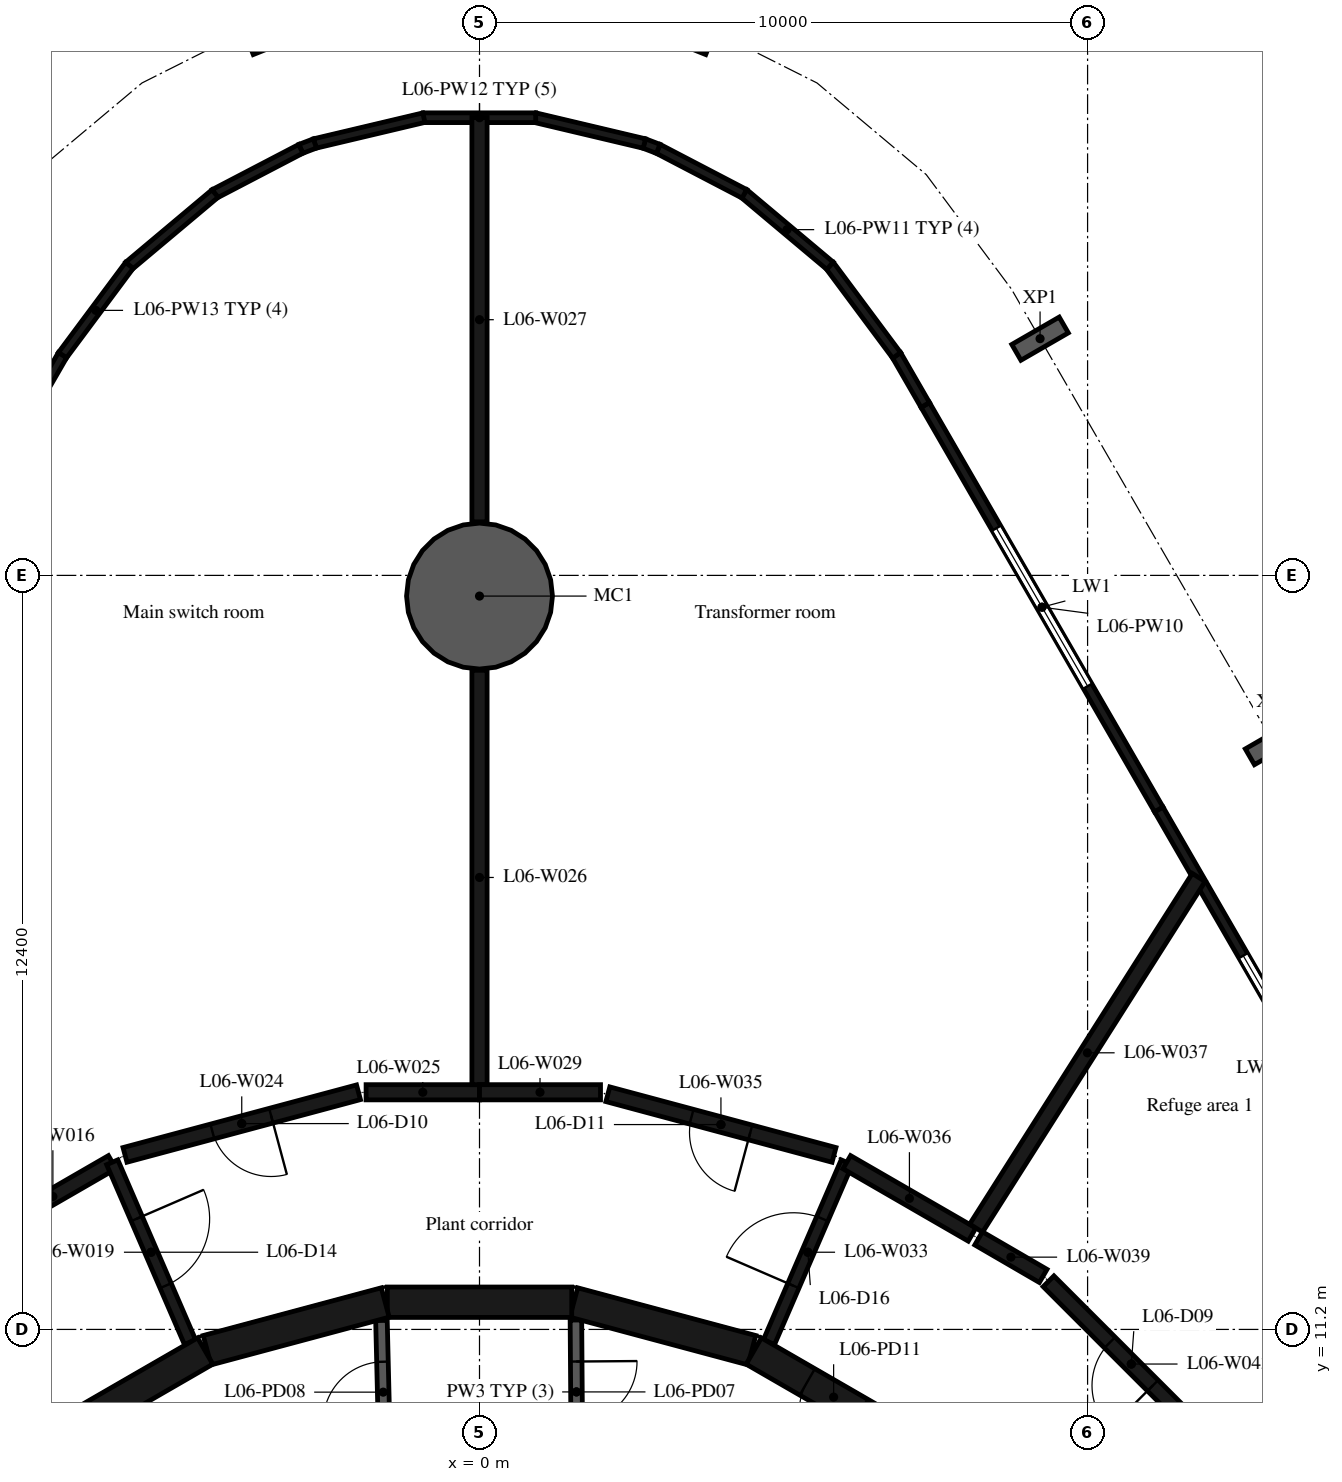
"""IFC4 building model, lengths in metres.
Left out: names, types, materials, properties, quantities, classifications, styles, units other than length and angle.
Written with IfcOpenShell. Run it as: python <this file> out.ifc"""

import sys

from ifc_helpers import new_model, si_unit, direction, frame, frame_2d, origin, origin_2d, place, context, subcontext, project, spatial, rectangle, hollow_circle, i_section, extrude, element, fill, save


model = new_model("IFC4")
c1 = context("Model", 3, precision=1e-05, world=origin(), true_north=direction((0.0, 1.0)))
c2 = subcontext(c1, "Body", "Model", "MODEL_VIEW")
j1 = project(units=[si_unit("LENGTHUNIT", "METRE"), si_unit("PLANEANGLEUNIT", "RADIAN")], contexts=[c1])
p1 = place(None, origin())
s1 = spatial("IfcSite", under=j1, at=p1, CompositionType="ELEMENT")
p2 = place(p1, origin())
s2 = spatial("IfcBuilding", under=s1, at=p2, CompositionType="ELEMENT")
p3 = place(p2, frame((0.0, 0.0, 33.0)))
s3 = spatial("IfcBuildingStorey", under=s2, at=p3, CompositionType="ELEMENT", Elevation=33.0)
p4 = place(p3, frame((0.0, 23.26, -0.45), z_axis=(0.0, 0.0, 1.0), x_axis=(1.0, 0.0, 0.0)))
e1 = element("IfcColumn", 1, at=p4, inside=s3, PredefinedType="COLUMN", context=c2, shape_type="SweptSolid", body=[
    extrude(hollow_circle(Radius=1.2, WallThickness=0.06, at=origin_2d()), origin(), (0.0, 0.0, 1.0), 5.4),
])
for number, where, z_axis, x_axis in (
    (2, (13.059, 20.842, -0.45), (0.0, 0.0, 1.0), (0.5, -0.866, 0.0)),
    (3, (9.219, 27.493, -0.45), (0.0, 0.0, 1.0), (0.5, -0.866, 0.0)),
    (4, (3.748, 32.639, -0.45), (0.0, 0.0, 1.0), (0.929, -0.371, 0.0)),
    (5, (-3.748, 32.639, -0.45), (0.0, 0.0, 1.0), (0.929, 0.371, 0.0)),
):
    element("IfcColumn", number, at=place(p3, frame(where, z_axis=z_axis, x_axis=x_axis)), inside=s3, PredefinedType="COLUMN", context=c2, shape_type="SweptSolid", body=[
        extrude(i_section(OverallWidth=0.3, OverallDepth=0.9, WebThickness=0.019, FlangeThickness=0.035, FilletRadius=0.03, at=origin_2d()), origin(), (0.0, 0.0, 1.0), 5.4),
    ])
p5 = place(p3, frame((15.011, 13.101, 0.0), z_axis=(0.0, 0.0, 1.0), x_axis=(-0.500005879718, 0.866022009101, 0.0)))
e6 = element("IfcWall", 6, at=p5, inside=s3, PredefinedType="STANDARD", context=c2, shape_type="SweptSolid", body=[
    extrude(rectangle(XDim=7.68, YDim=0.16, at=frame_2d((3.84, 0.0))), origin(), (0.0, 0.0, 1.0), 4.95),
])
p6 = place(p5, frame((1.902, 0.0, 1.0)))
e7 = element("IfcOpeningElement", 7, at=p6, cuts=e6, PredefinedType="OPENING", context=c2, shape_type="SweptSolid", body=[
    extrude(rectangle(XDim=3.0, YDim=2.2, at=frame_2d((1.5, 1.1))), frame((0.0, 0.09, 0.0), z_axis=(0.0, -1.0, 0.0), x_axis=(1.0, 0.0, 0.0)), (0.0, 0.0, 1.0), 0.18),
])
p7 = place(p3, frame((11.171, 19.752, 0.0), z_axis=(0.0, 0.0, 1.0), x_axis=(-0.500005879718, 0.866022009101, 0.0)))
e8 = element("IfcWall", 8, at=p7, inside=s3, PredefinedType="STANDARD", context=c2, shape_type="SweptSolid", body=[
    extrude(rectangle(XDim=7.68, YDim=0.16, at=frame_2d((3.84, 0.0))), origin(), (0.0, 0.0, 1.0), 4.95),
])
p8 = place(p7, frame((2.34, 0.0, 1.0)))
e9 = element("IfcOpeningElement", 9, at=p8, cuts=e8, PredefinedType="OPENING", context=c2, shape_type="SweptSolid", body=[
    extrude(rectangle(XDim=3.0, YDim=2.2, at=frame_2d((1.5, 1.1))), frame((0.0, 0.09, 0.0), z_axis=(0.0, -1.0, 0.0), x_axis=(1.0, 0.0, 0.0)), (0.0, 0.0, 1.0), 0.18),
])
p9 = place(p3, frame((7.331, 26.403, 0.0), z_axis=(0.0, 0.0, 1.0), x_axis=(-0.499916178513, 0.866073792734, 0.0)))
e10 = element("IfcWall", 10, at=p9, inside=s3, PredefinedType="STANDARD", context=c2, shape_type="SweptSolid", body=[
    extrude(rectangle(XDim=0.946, YDim=0.16, at=frame_2d((0.473, 0.0))), origin(), (0.0, 0.0, 1.0), 4.95),
])
p10 = place(p3, frame((6.86, 27.218, 0.0), z_axis=(0.0, 0.0, 1.0), x_axis=(-0.597202782017, 0.802090292393, 0.0)))
e11 = element("IfcWall", 11, at=p10, inside=s3, PredefinedType="STANDARD", context=c2, shape_type="SweptSolid", body=[
    extrude(rectangle(XDim=1.846, YDim=0.16, at=frame_2d((0.923, 0.0))), origin(), (0.0, 0.0, 1.0), 4.95),
])
p11 = place(p3, frame((5.764, 28.692, 0.0), z_axis=(0.0, 0.0, 1.0), x_axis=(-0.766050926865, 0.64277988258, 0.0)))
e12 = element("IfcWall", 12, at=p11, inside=s3, PredefinedType="STANDARD", context=c2, shape_type="SweptSolid", body=[
    extrude(rectangle(XDim=1.848, YDim=0.16, at=frame_2d((0.924, 0.0))), origin(), (0.0, 0.0, 1.0), 4.95),
])
p12 = place(p3, frame((4.356, 29.875, 0.0), z_axis=(0.0, 0.0, 1.0), x_axis=(-0.886563052372, 0.462607775734, 0.0)))
e13 = element("IfcWall", 13, at=p12, inside=s3, PredefinedType="STANDARD", context=c2, shape_type="SweptSolid", body=[
    extrude(rectangle(XDim=1.598, YDim=0.16, at=frame_2d((0.799, 0.0))), origin(), (0.0, 0.0, 1.0), 4.95),
])
p13 = place(p3, frame((2.939, 30.614, 0.0), z_axis=(0.0, 0.0, 1.0), x_axis=(-0.934301433369, 0.356483985059, 0.0)))
e14 = element("IfcWall", 14, at=p13, inside=s3, PredefinedType="STANDARD", context=c2, shape_type="SweptSolid", body=[
    extrude(rectangle(XDim=0.249, YDim=0.16, at=frame_2d((0.125, 0.0))), origin(), (0.0, 0.0, 1.0), 4.95),
])
p14 = place(p3, frame((2.711, 30.702, 0.0), z_axis=(0.0, 0.0, 1.0), x_axis=(-0.973077946325, 0.230476268575, 0.0)))
e15 = element("IfcWall", 15, at=p14, inside=s3, PredefinedType="STANDARD", context=c2, shape_type="SweptSolid", body=[
    extrude(rectangle(XDim=1.846, YDim=0.16, at=frame_2d((0.923, 0.0))), origin(), (0.0, 0.0, 1.0), 4.95),
])
p15 = place(p3, frame((0.924, 31.126, 0.0), z_axis=(0.0, 0.0, 1.0), x_axis=(-1.0, 0.0, 0.0)))
e16 = element("IfcWall", 16, at=p15, inside=s3, PredefinedType="STANDARD", context=c2, shape_type="SweptSolid", body=[
    extrude(rectangle(XDim=1.848, YDim=0.16, at=frame_2d((0.924, 0.0))), origin(), (0.0, 0.0, 1.0), 4.95),
])
p16 = place(p3, frame((-0.915, 31.127, 0.0), z_axis=(0.0, 0.0, 1.0), x_axis=(-0.973077946325, -0.230476268575, 0.0)))
e17 = element("IfcWall", 17, at=p16, inside=s3, PredefinedType="STANDARD", context=c2, shape_type="SweptSolid", body=[
    extrude(rectangle(XDim=1.846, YDim=0.16, at=frame_2d((0.923, 0.0))), origin(), (0.0, 0.0, 1.0), 4.95),
])
p17 = place(p3, frame((-2.706, 30.703, 0.0), z_axis=(0.0, 0.0, 1.0), x_axis=(-0.934301433369, -0.356483985059, 0.0)))
e18 = element("IfcWall", 18, at=p17, inside=s3, PredefinedType="STANDARD", context=c2, shape_type="SweptSolid", body=[
    extrude(rectangle(XDim=0.249, YDim=0.16, at=frame_2d((0.125, 0.0))), origin(), (0.0, 0.0, 1.0), 4.95),
])
p18 = place(p3, frame((-2.939, 30.614, 0.0), z_axis=(0.0, 0.0, 1.0), x_axis=(-0.886563052372, -0.462607775734, 0.0)))
e19 = element("IfcWall", 19, at=p18, inside=s3, PredefinedType="STANDARD", context=c2, shape_type="SweptSolid", body=[
    extrude(rectangle(XDim=1.598, YDim=0.16, at=frame_2d((0.799, 0.0))), origin(), (0.0, 0.0, 1.0), 4.95),
])
p19 = place(p3, frame((-4.349, 29.88, 0.0), z_axis=(0.0, 0.0, 1.0), x_axis=(-0.766050926865, -0.64277988258, 0.0)))
e20 = element("IfcWall", 20, at=p19, inside=s3, PredefinedType="STANDARD", context=c2, shape_type="SweptSolid", body=[
    extrude(rectangle(XDim=1.848, YDim=0.16, at=frame_2d((0.924, 0.0))), origin(), (0.0, 0.0, 1.0), 4.95),
])
p20 = place(p3, frame((-5.758, 28.698, 0.0), z_axis=(0.0, 0.0, 1.0), x_axis=(-0.597202782017, -0.802090292393, 0.0)))
e21 = element("IfcWall", 21, at=p20, inside=s3, PredefinedType="STANDARD", context=c2, shape_type="SweptSolid", body=[
    extrude(rectangle(XDim=1.846, YDim=0.16, at=frame_2d((0.923, 0.0))), origin(), (0.0, 0.0, 1.0), 4.95),
])
p21 = place(p3, frame((-6.858, 27.222, 0.0), z_axis=(0.0, 0.0, 1.0), x_axis=(-0.499916178513, -0.866073792734, 0.0)))
e22 = element("IfcWall", 22, at=p21, inside=s3, PredefinedType="STANDARD", context=c2, shape_type="SweptSolid", body=[
    extrude(rectangle(XDim=0.946, YDim=0.16, at=frame_2d((0.473, 0.0))), origin(), (0.0, 0.0, 1.0), 4.95),
])
p22 = place(p3, frame((7.137, 9.329, 0.0), z_axis=(0.0, 0.0, 1.0), x_axis=(-0.865975092491, 0.500087131594, 0.0)))
e23 = element("IfcWall", 23, at=p22, inside=s3, PredefinedType="SHEAR", context=c2, shape_type="SweptSolid", body=[
    extrude(rectangle(XDim=3.033, YDim=0.5, at=frame_2d((1.516, 0.0))), origin(), (0.0, 0.0, 1.0), 4.95),
])
p23 = place(p22, frame((1.016, 0.0, 0.0)))
e24 = element("IfcOpeningElement", 24, at=p23, cuts=e23, PredefinedType="OPENING", context=c2, shape_type="SweptSolid", body=[
    extrude(rectangle(XDim=1.0, YDim=2.4, at=frame_2d((0.5, 1.2))), frame((0.0, 0.26, 0.0), z_axis=(0.0, -1.0, 0.0), x_axis=(1.0, 0.0, 0.0)), (0.0, 0.0, 1.0), 0.52),
])
for number, where, z_axis, x_axis in (
    (25, (4.479, 10.858, 0.0), (0.0, 0.0, 1.0), (-0.966, 0.259, 0.0)),
    (26, (1.516, 11.647, 0.0), (0.0, 0.0, 1.0), (-1.0, 0.0, 0.0)),
    (27, (-1.55, 11.643, 0.0), (0.0, 0.0, 1.0), (-0.966, -0.259, 0.0)),
    (28, (-4.51, 10.845, 0.0), (0.0, 0.0, 1.0), (-0.866, -0.5, 0.0)),
):
    element("IfcWall", number, at=place(p3, frame(where, z_axis=z_axis, x_axis=x_axis)), inside=s3, PredefinedType="SHEAR", context=c2, shape_type="SweptSolid", body=[
        extrude(rectangle(XDim=3.033, YDim=0.5, at=frame_2d((1.516, 0.0))), origin(), (0.0, 0.0, 1.0), 4.95),
    ])
p24 = place(p3, frame((1.586, 11.354, 0.0), z_axis=(0.0, 0.0, 1.0), x_axis=(0.007227482881, -0.999973881405, 0.0)))
e29 = element("IfcWall", 29, at=p24, inside=s3, PredefinedType="PARTITIONING", context=c2, shape_type="SweptSolid", body=[
    extrude(rectangle(XDim=2.365, YDim=0.19, at=frame_2d((1.182, 0.0))), origin(), (0.0, 0.0, 1.0), 4.95),
])
p25 = place(p24, frame((0.682, 0.0, 0.0)))
e30 = element("IfcOpeningElement", 30, at=p25, cuts=e29, PredefinedType="OPENING", context=c2, shape_type="SweptSolid", body=[
    extrude(rectangle(XDim=1.0, YDim=2.4, at=frame_2d((0.5, 1.2))), frame((0.0, 0.105, 0.0), z_axis=(0.0, -1.0, 0.0), x_axis=(1.0, 0.0, 0.0)), (0.0, 0.0, 1.0), 0.21),
])
p26 = place(p3, frame((-1.555, 8.99, 0.0), z_axis=(0.0, 0.0, 1.0), x_axis=(-0.024125549686, 0.999708936567, 0.0)))
e31 = element("IfcWall", 31, at=p26, inside=s3, PredefinedType="PARTITIONING", context=c2, shape_type="SweptSolid", body=[
    extrude(rectangle(XDim=2.358, YDim=0.19, at=frame_2d((1.179, 0.0))), origin(), (0.0, 0.0, 1.0), 4.95),
])
p27 = place(p26, frame((0.679, 0.0, 0.0)))
e32 = element("IfcOpeningElement", 32, at=p27, cuts=e31, PredefinedType="OPENING", context=c2, shape_type="SweptSolid", body=[
    extrude(rectangle(XDim=1.0, YDim=2.4, at=frame_2d((0.5, 1.2))), frame((0.0, 0.105, 0.0), z_axis=(0.0, -1.0, 0.0), x_axis=(1.0, 0.0, 0.0)), (0.0, 0.0, 1.0), 0.21),
])
p28 = place(p3, frame((-7.992, 12.823, 0.0), z_axis=(0.0, 0.0, 1.0), x_axis=(0.865900522319, 0.500216238688, 0.0)))
e33 = element("IfcWall", 33, at=p28, inside=s3, PredefinedType="PARTITIONING", context=c2, shape_type="SweptSolid", body=[
    extrude(rectangle(XDim=2.254, YDim=0.25, at=frame_2d((1.127, 0.0))), origin(), (0.0, 0.0, 1.0), 4.95),
])
p29 = place(p3, frame((-6.04, 13.949, 0.0), z_axis=(0.0, 0.0, 1.0), x_axis=(0.396905977672, -0.917859272922, 0.0)))
e34 = element("IfcWall", 34, at=p29, inside=s3, PredefinedType="PARTITIONING", context=c2, shape_type="SweptSolid", body=[
    extrude(rectangle(XDim=3.224, YDim=0.2, at=frame_2d((1.612, 0.0))), origin(), (0.0, 0.0, 1.0), 4.95),
])
p30 = place(p29, frame((1.012, 0.0, 0.0)))
e35 = element("IfcOpeningElement", 35, at=p30, cuts=e34, PredefinedType="OPENING", context=c2, shape_type="SweptSolid", body=[
    extrude(rectangle(XDim=1.2, YDim=2.1, at=frame_2d((0.6, 1.05))), frame((0.0, 0.11, 0.0), z_axis=(0.0, -1.0, 0.0), x_axis=(1.0, 0.0, 0.0)), (0.0, 0.0, 1.0), 0.22),
])
p31 = place(p3, frame((-1.99, 15.1, 0.0), z_axis=(0.0, 0.0, 1.0), x_axis=(-0.965857829358, -0.259072679895, 0.0)))
e36 = element("IfcWall", 36, at=p31, inside=s3, PredefinedType="PARTITIONING", context=c2, shape_type="SweptSolid", body=[
    extrude(rectangle(XDim=3.976, YDim=0.25, at=frame_2d((1.988, 0.0))), origin(), (0.0, 0.0, 1.0), 4.95),
])
p32 = place(p31, frame((1.488, 0.0, 0.0)))
e37 = element("IfcOpeningElement", 37, at=p32, cuts=e36, PredefinedType="OPENING", context=c2, shape_type="SweptSolid", body=[
    extrude(rectangle(XDim=1.0, YDim=2.1, at=frame_2d((0.5, 1.05))), frame((0.0, 0.135, 0.0), z_axis=(0.0, -1.0, 0.0), x_axis=(1.0, 0.0, 0.0)), (0.0, 0.0, 1.0), 0.27),
])
p33 = place(p3, frame((0.0, 15.1, 0.0), z_axis=(0.0, 0.0, 1.0), x_axis=(-1.0, 0.0, 0.0)))
e38 = element("IfcWall", 38, at=p33, inside=s3, PredefinedType="PARTITIONING", context=c2, shape_type="SweptSolid", body=[
    extrude(rectangle(XDim=1.865, YDim=0.25, at=frame_2d((0.933, 0.0))), origin(), (0.0, 0.0, 1.0), 4.95),
])
p34 = place(p3, frame((0.0, 15.225, 0.0), z_axis=(0.0, 0.0, 1.0), x_axis=(0.0, 1.0, 0.0)))
e39 = element("IfcWall", 39, at=p34, inside=s3, PredefinedType="PARTITIONING", context=c2, shape_type="SweptSolid", body=[
    extrude(rectangle(XDim=6.815, YDim=0.25, at=frame_2d((3.407, 0.0))), origin(), (0.0, 0.0, 1.0), 4.95),
])
p35 = place(p3, frame((0.0, 24.48, 0.0), z_axis=(0.0, 0.0, 1.0), x_axis=(0.0, 1.0, 0.0)))
e40 = element("IfcWall", 40, at=p35, inside=s3, PredefinedType="PARTITIONING", context=c2, shape_type="SweptSolid", body=[
    extrude(rectangle(XDim=6.65, YDim=0.25, at=frame_2d((3.325, 0.0))), origin(), (0.0, 0.0, 1.0), 4.95),
])
p36 = place(p3, frame((1.99, 15.1, 0.0), z_axis=(0.0, 0.0, 1.0), x_axis=(-1.0, 0.0, 0.0)))
e41 = element("IfcWall", 41, at=p36, inside=s3, PredefinedType="PARTITIONING", context=c2, shape_type="SweptSolid", body=[
    extrude(rectangle(XDim=1.99, YDim=0.25, at=frame_2d((0.995, 0.0))), origin(), (0.0, 0.0, 1.0), 4.95),
])
p37 = place(p3, frame((4.76, 10.99, 0.0), z_axis=(0.0, 0.0, 1.0), x_axis=(0.396905977672, 0.917859272922, 0.0)))
e42 = element("IfcWall", 42, at=p37, inside=s3, PredefinedType="PARTITIONING", context=c2, shape_type="SweptSolid", body=[
    extrude(rectangle(XDim=3.224, YDim=0.2, at=frame_2d((1.612, 0.0))), origin(), (0.0, 0.0, 1.0), 4.95),
])
p38 = place(p37, frame((1.012, 0.0, 0.0)))
e43 = element("IfcOpeningElement", 43, at=p38, cuts=e42, PredefinedType="OPENING", context=c2, shape_type="SweptSolid", body=[
    extrude(rectangle(XDim=1.2, YDim=2.1, at=frame_2d((0.6, 1.05))), frame((0.0, 0.11, 0.0), z_axis=(0.0, -1.0, 0.0), x_axis=(1.0, 0.0, 0.0)), (0.0, 0.0, 1.0), 0.22),
])
p39 = place(p3, frame((5.83, 14.07, 0.0), z_axis=(0.0, 0.0, 1.0), x_axis=(-0.965861411942, 0.259059323171, 0.0)))
e44 = element("IfcWall", 44, at=p39, inside=s3, PredefinedType="PARTITIONING", context=c2, shape_type="SweptSolid", body=[
    extrude(rectangle(XDim=3.851, YDim=0.25, at=frame_2d((1.925, 0.0))), origin(), (0.0, 0.0, 1.0), 4.95),
])
p40 = place(p39, frame((1.425, 0.0, 0.0)))
e45 = element("IfcOpeningElement", 45, at=p40, cuts=e44, PredefinedType="OPENING", context=c2, shape_type="SweptSolid", body=[
    extrude(rectangle(XDim=1.0, YDim=2.1, at=frame_2d((0.5, 1.05))), frame((0.0, 0.135, 0.0), z_axis=(0.0, -1.0, 0.0), x_axis=(1.0, 0.0, 0.0)), (0.0, 0.0, 1.0), 0.27),
])
p41 = place(p3, frame((6.04, 13.95, 0.0), z_axis=(0.0, 0.0, 1.0), x_axis=(0.865922362496, -0.500178430292, 0.0)))
e46 = element("IfcWall", 46, at=p41, inside=s3, PredefinedType="PARTITIONING", context=c2, shape_type="SweptSolid", body=[
    extrude(rectangle(XDim=2.379, YDim=0.25, at=frame_2d((1.189, 0.0))), origin(), (0.0, 0.0, 1.0), 4.95),
])
p42 = place(p3, frame((8.167, 12.865, 0.0), z_axis=(0.0, 0.0, 1.0), x_axis=(0.535852860109, 0.844311383503, 0.0)))
e47 = element("IfcWall", 47, at=p42, inside=s3, PredefinedType="PARTITIONING", context=c2, shape_type="SweptSolid", body=[
    extrude(rectangle(XDim=6.831, YDim=0.25, at=frame_2d((3.415, 0.0))), origin(), (0.0, 0.0, 1.0), 4.95),
])
p43 = place(p3, frame((9.27, 12.08, 0.0), z_axis=(0.0, 0.0, 1.0), x_axis=(-0.864599561852, 0.502461538474, 0.0)))
e48 = element("IfcWall", 48, at=p43, inside=s3, PredefinedType="PARTITIONING", context=c2, shape_type="SweptSolid", body=[
    extrude(rectangle(XDim=1.228, YDim=0.25, at=frame_2d((0.614, 0.0))), origin(), (0.0, 0.0, 1.0), 4.95),
])
p44 = place(p3, frame((12.08, 9.27, 0.0), z_axis=(0.0, 0.0, 1.0), x_axis=(-0.707106781187, 0.707106781187, 0.0)))
e49 = element("IfcWall", 49, at=p44, inside=s3, PredefinedType="PARTITIONING", context=c2, shape_type="SweptSolid", body=[
    extrude(rectangle(XDim=3.849, YDim=0.25, at=frame_2d((1.925, 0.0))), origin(), (0.0, 0.0, 1.0), 4.95),
])
p45 = place(p44, frame((1.425, 0.0, 0.0)))
e50 = element("IfcOpeningElement", 50, at=p45, cuts=e49, PredefinedType="OPENING", context=c2, shape_type="SweptSolid", body=[
    extrude(rectangle(XDim=1.0, YDim=2.1, at=frame_2d((0.5, 1.05))), frame((0.0, 0.135, 0.0), z_axis=(0.0, -1.0, 0.0), x_axis=(1.0, 0.0, 0.0)), (0.0, 0.0, 1.0), 0.27),
])
p46 = place(p6, origin())
e51 = element("IfcWindow", 51, at=p46, inside=s3, PartitioningType="SINGLE_PANEL", PredefinedType="WINDOW", context=c2, shape_type="SweptSolid", body=[
    extrude(rectangle(XDim=3.0, YDim=2.2, at=frame_2d((1.5, 1.1))), frame((0.0, 0.03, 0.0), z_axis=(0.0, -1.0, 0.0), x_axis=(1.0, 0.0, 0.0)), (0.0, 0.0, 1.0), 0.06),
])
fill(e7, e51)
p47 = place(p8, origin())
e52 = element("IfcWindow", 52, at=p47, inside=s3, PartitioningType="SINGLE_PANEL", PredefinedType="WINDOW", context=c2, shape_type="SweptSolid", body=[
    extrude(rectangle(XDim=3.0, YDim=2.2, at=frame_2d((1.5, 1.1))), frame((0.0, 0.03, 0.0), z_axis=(0.0, -1.0, 0.0), x_axis=(1.0, 0.0, 0.0)), (0.0, 0.0, 1.0), 0.06),
])
fill(e9, e52)
p48 = place(p25, origin())
e53 = element("IfcDoor", 53, at=p48, inside=s3, OperationType="SINGLE_SWING_RIGHT", PredefinedType="DOOR", context=c2, shape_type="SweptSolid", body=[
    extrude(rectangle(XDim=1.0, YDim=2.4, at=frame_2d((0.5, 1.2))), frame((0.0, 0.025, 0.0), z_axis=(0.0, -1.0, 0.0), x_axis=(1.0, 0.0, 0.0)), (0.0, 0.0, 1.0), 0.05),
])
fill(e30, e53)
p49 = place(p27, origin())
e54 = element("IfcDoor", 54, at=p49, inside=s3, OperationType="SINGLE_SWING_LEFT", PredefinedType="DOOR", context=c2, shape_type="SweptSolid", body=[
    extrude(rectangle(XDim=1.0, YDim=2.4, at=frame_2d((0.5, 1.2))), frame((0.0, 0.025, 0.0), z_axis=(0.0, -1.0, 0.0), x_axis=(1.0, 0.0, 0.0)), (0.0, 0.0, 1.0), 0.05),
])
fill(e32, e54)
p50 = place(p23, origin())
e55 = element("IfcDoor", 55, at=p50, inside=s3, OperationType="SINGLE_SWING_RIGHT", PredefinedType="DOOR", context=c2, shape_type="SweptSolid", body=[
    extrude(rectangle(XDim=1.0, YDim=2.4, at=frame_2d((0.5, 1.2))), frame((0.0, 0.025, 0.0), z_axis=(0.0, -1.0, 0.0), x_axis=(1.0, 0.0, 0.0)), (0.0, 0.0, 1.0), 0.05),
])
fill(e24, e55)
p51 = place(p45, origin())
e56 = element("IfcDoor", 56, at=p51, inside=s3, OperationType="SINGLE_SWING_LEFT", PredefinedType="DOOR", context=c2, shape_type="SweptSolid", body=[
    extrude(rectangle(XDim=1.0, YDim=2.1, at=frame_2d((0.5, 1.05))), frame((0.0, 0.025, 0.0), z_axis=(0.0, -1.0, 0.0), x_axis=(1.0, 0.0, 0.0)), (0.0, 0.0, 1.0), 0.05),
])
fill(e50, e56)
p52 = place(p32, origin())
e57 = element("IfcDoor", 57, at=p52, inside=s3, OperationType="SINGLE_SWING_LEFT", PredefinedType="DOOR", context=c2, shape_type="SweptSolid", body=[
    extrude(rectangle(XDim=1.0, YDim=2.1, at=frame_2d((0.5, 1.05))), frame((0.0, 0.025, 0.0), z_axis=(0.0, -1.0, 0.0), x_axis=(1.0, 0.0, 0.0)), (0.0, 0.0, 1.0), 0.05),
])
fill(e37, e57)
p53 = place(p40, origin())
e58 = element("IfcDoor", 58, at=p53, inside=s3, OperationType="SINGLE_SWING_LEFT", PredefinedType="DOOR", context=c2, shape_type="SweptSolid", body=[
    extrude(rectangle(XDim=1.0, YDim=2.1, at=frame_2d((0.5, 1.05))), frame((0.0, 0.025, 0.0), z_axis=(0.0, -1.0, 0.0), x_axis=(1.0, 0.0, 0.0)), (0.0, 0.0, 1.0), 0.05),
])
fill(e45, e58)
p54 = place(p30, origin())
e59 = element("IfcDoor", 59, at=p54, inside=s3, OperationType="SINGLE_SWING_LEFT", PredefinedType="DOOR", context=c2, shape_type="SweptSolid", body=[
    extrude(rectangle(XDim=1.2, YDim=2.1, at=frame_2d((0.6, 1.05))), frame((0.0, 0.025, 0.0), z_axis=(0.0, -1.0, 0.0), x_axis=(1.0, 0.0, 0.0)), (0.0, 0.0, 1.0), 0.05),
])
fill(e35, e59)
p55 = place(p38, origin())
e60 = element("IfcDoor", 60, at=p55, inside=s3, OperationType="SINGLE_SWING_LEFT", PredefinedType="DOOR", context=c2, shape_type="SweptSolid", body=[
    extrude(rectangle(XDim=1.2, YDim=2.1, at=frame_2d((0.6, 1.05))), frame((0.0, 0.025, 0.0), z_axis=(0.0, -1.0, 0.0), x_axis=(1.0, 0.0, 0.0)), (0.0, 0.0, 1.0), 0.05),
])
fill(e43, e60)
save(model, sys.argv[1])
